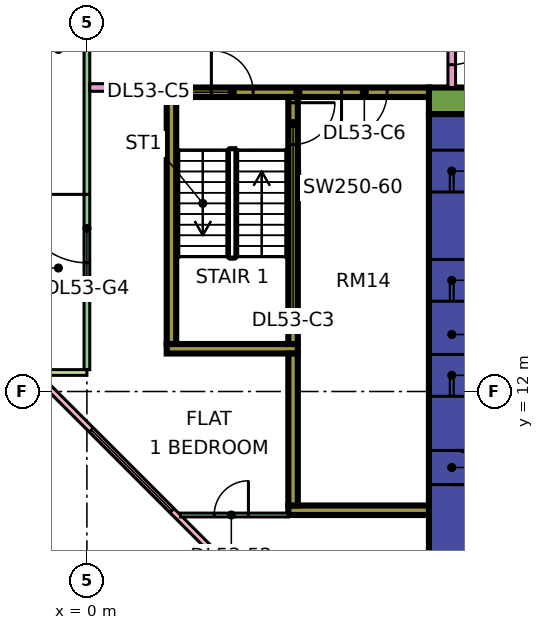
"""IFC4 building model, lengths in metres.
Left out: names, types, materials, properties, quantities, classifications, styles, units other than length and angle.
Written with IfcOpenShell. Run it as: python <this file> out.ifc"""

import sys

from ifc_helpers import new_model, si_unit, direction, frame, frame_2d, origin, place, context, subcontext, project, spatial, rectangle, extrude, element, fill, save


model = new_model("IFC4")
c1 = context("Model", 3, precision=1e-05, world=origin(), true_north=direction((0.0, 1.0)))
c2 = subcontext(c1, "Body", "Model", "MODEL_VIEW")
j1 = project(units=[si_unit("LENGTHUNIT", "METRE"), si_unit("PLANEANGLEUNIT", "RADIAN")], contexts=[c1])
p1 = place(None, origin())
s1 = spatial("IfcSite", under=j1, at=p1, CompositionType="ELEMENT")
p2 = place(p1, origin())
s2 = spatial("IfcBuilding", under=s1, at=p2, CompositionType="ELEMENT")
p3 = place(p2, frame((0.0, 0.0, 226.65)))
s3 = spatial("IfcBuildingStorey", under=s2, at=p3, CompositionType="ELEMENT", Elevation=226.65)
p4 = place(p3, frame((9.0, 19.65, 0.0), z_axis=(0.0, 0.0, 1.0), x_axis=(1.0, 0.0, 0.0)))
e1 = element("IfcWall", 1, at=p4, inside=s3, PredefinedType="SHEAR", context=c2, shape_type="SweptSolid", body=[
    extrude(rectangle(XDim=25.0, YDim=0.7, at=frame_2d((12.5, 0.0))), origin(), (0.0, 0.0, 1.0), 3.75),
])
p5 = place(p4, frame((19.1, 0.0, 0.0)))
e2 = element("IfcOpeningElement", 2, at=p5, cuts=e1, PredefinedType="OPENING", context=c2, shape_type="SweptSolid", body=[
    extrude(rectangle(XDim=1.8, YDim=2.4, at=frame_2d((0.9, 1.2))), frame((0.0, 0.36, 0.0), z_axis=(0.0, -1.0, 0.0), x_axis=(1.0, 0.0, 0.0)), (0.0, 0.0, 1.0), 0.72),
])
p6 = place(p3, frame((9.6, 7.7, 0.0), z_axis=(0.0, 0.0, 1.0), x_axis=(0.0, 1.0, 0.0)))
e3 = element("IfcWall", 3, at=p6, inside=s3, PredefinedType="SHEAR", context=c2, shape_type="SweptSolid", body=[
    extrude(rectangle(XDim=11.6, YDim=1.2, at=frame_2d((5.8, 0.0))), origin(), (0.0, 0.0, 1.0), 3.75),
])
p7 = place(p6, frame((4.175, 0.0, 0.0)))
e4 = element("IfcOpeningElement", 4, at=p7, cuts=e3, PredefinedType="OPENING", context=c2, shape_type="SweptSolid", body=[
    extrude(rectangle(XDim=1.1, YDim=2.2, at=frame_2d((0.55, 1.1))), frame((0.0, 0.61, 0.0), z_axis=(0.0, -1.0, 0.0), x_axis=(1.0, 0.0, 0.0)), (0.0, 0.0, 1.0), 1.22),
])
p8 = place(p6, frame((6.675, 0.0, 0.0)))
e5 = element("IfcOpeningElement", 5, at=p8, cuts=e3, PredefinedType="OPENING", context=c2, shape_type="SweptSolid", body=[
    extrude(rectangle(XDim=1.1, YDim=2.2, at=frame_2d((0.55, 1.1))), frame((0.0, 0.61, 0.0), z_axis=(0.0, -1.0, 0.0), x_axis=(1.0, 0.0, 0.0)), (0.0, 0.0, 1.0), 1.22),
])
p9 = place(p6, frame((9.55, 0.0, 0.0)))
e6 = element("IfcOpeningElement", 6, at=p9, cuts=e3, PredefinedType="OPENING", context=c2, shape_type="SweptSolid", body=[
    extrude(rectangle(XDim=1.1, YDim=2.2, at=frame_2d((0.55, 1.1))), frame((0.0, 0.61, 0.0), z_axis=(0.0, -1.0, 0.0), x_axis=(1.0, 0.0, 0.0)), (0.0, 0.0, 1.0), 1.22),
])
p10 = place(p6, frame((1.85, 0.0, 0.0)))
e7 = element("IfcOpeningElement", 7, at=p10, cuts=e3, PredefinedType="OPENING", context=c2, shape_type="SweptSolid", body=[
    extrude(rectangle(XDim=0.9, YDim=2.1, at=frame_2d((0.45, 1.05))), frame((0.0, 0.61, 0.0), z_axis=(0.0, -1.0, 0.0), x_axis=(1.0, 0.0, 0.0)), (0.0, 0.0, 1.0), 1.22),
])
p11 = place(p3, frame((2.1, 19.875, 0.0), z_axis=(0.0, 0.0, 1.0), x_axis=(1.0, 0.0, 0.0)))
e8 = element("IfcWall", 8, at=p11, inside=s3, PredefinedType="SHEAR", context=c2, shape_type="SweptSolid", body=[
    extrude(rectangle(XDim=6.9, YDim=0.25, at=frame_2d((3.45, 0.0))), origin(), (0.0, 0.0, 1.0), 3.75),
])
p12 = place(p11, frame((1.175, 0.0, 0.0)))
e9 = element("IfcOpeningElement", 9, at=p12, cuts=e8, PredefinedType="OPENING", context=c2, shape_type="SweptSolid", body=[
    extrude(rectangle(XDim=1.1, YDim=2.2, at=frame_2d((0.55, 1.1))), frame((0.0, 0.135, 0.0), z_axis=(0.0, -1.0, 0.0), x_axis=(1.0, 0.0, 0.0)), (0.0, 0.0, 1.0), 0.27),
])
p13 = place(p11, frame((4.6, 0.0, 0.0)))
e10 = element("IfcOpeningElement", 10, at=p13, cuts=e8, PredefinedType="OPENING", context=c2, shape_type="SweptSolid", body=[
    extrude(rectangle(XDim=1.2, YDim=2.2, at=frame_2d((0.6, 1.1))), frame((0.0, 0.135, 0.0), z_axis=(0.0, -1.0, 0.0), x_axis=(1.0, 0.0, 0.0)), (0.0, 0.0, 1.0), 0.27),
])
p14 = place(p3, frame((2.1, 13.125, 0.0), z_axis=(0.0, 0.0, 1.0), x_axis=(1.0, 0.0, 0.0)))
e11 = element("IfcWall", 11, at=p14, inside=s3, PredefinedType="SHEAR", context=c2, shape_type="SweptSolid", body=[
    extrude(rectangle(XDim=3.45, YDim=0.25, at=frame_2d((1.725, 0.0))), origin(), (0.0, 0.0, 1.0), 3.75),
])
p15 = place(p3, frame((2.225, 13.25, 0.0), z_axis=(0.0, 0.0, 1.0), x_axis=(0.0, 1.0, 0.0)))
e12 = element("IfcWall", 12, at=p15, inside=s3, PredefinedType="SHEAR", context=c2, shape_type="SweptSolid", body=[
    extrude(rectangle(XDim=6.5, YDim=0.25, at=frame_2d((3.25, 0.0))), origin(), (0.0, 0.0, 1.0), 3.75),
])
p16 = place(p3, frame((5.425, 13.25, 0.0), z_axis=(0.0, 0.0, 1.0), x_axis=(0.0, 1.0, 0.0)))
e13 = element("IfcWall", 13, at=p16, inside=s3, PredefinedType="SHEAR", context=c2, shape_type="SweptSolid", body=[
    extrude(rectangle(XDim=6.5, YDim=0.25, at=frame_2d((3.25, 0.0))), origin(), (0.0, 0.0, 1.0), 3.75),
])
p17 = place(p16, frame((5.25, 0.0, 0.0)))
e14 = element("IfcOpeningElement", 14, at=p17, cuts=e13, PredefinedType="OPENING", context=c2, shape_type="SweptSolid", body=[
    extrude(rectangle(XDim=1.1, YDim=2.2, at=frame_2d((0.55, 1.1))), frame((0.0, 0.135, 0.0), z_axis=(0.0, -1.0, 0.0), x_axis=(1.0, 0.0, 0.0)), (0.0, 0.0, 1.0), 0.27),
])
p18 = place(p3, frame((5.3, 8.875, 0.0), z_axis=(0.0, 0.0, 1.0), x_axis=(1.0, 0.0, 0.0)))
e15 = element("IfcWall", 15, at=p18, inside=s3, PredefinedType="SHEAR", context=c2, shape_type="SweptSolid", body=[
    extrude(rectangle(XDim=3.7, YDim=0.25, at=frame_2d((1.85, 0.0))), origin(), (0.0, 0.0, 1.0), 3.75),
])
p19 = place(p3, frame((5.425, 9.0, 0.0), z_axis=(0.0, 0.0, 1.0), x_axis=(0.0, 1.0, 0.0)))
e16 = element("IfcWall", 16, at=p19, inside=s3, PredefinedType="SHEAR", context=c2, shape_type="SweptSolid", body=[
    extrude(rectangle(XDim=4.0, YDim=0.25, at=frame_2d((2.0, 0.0))), origin(), (0.0, 0.0, 1.0), 3.75),
])
p20 = place(p3, frame((0.0, 23.925, 0.0), z_axis=(0.0, 0.0, 1.0), x_axis=(0.0, -1.0, 0.0)))
e17 = element("IfcWall", 17, at=p20, inside=s3, PredefinedType="SOLIDWALL", context=c2, shape_type="SweptSolid", body=[
    extrude(rectangle(XDim=11.35, YDim=0.15, at=frame_2d((5.675, 0.0))), origin(), (0.0, 0.0, 1.0), 3.35),
])
p21 = place(p20, frame((6.738, 0.0, 0.0)))
e18 = element("IfcOpeningElement", 18, at=p21, cuts=e17, PredefinedType="OPENING", context=c2, shape_type="SweptSolid", body=[
    extrude(rectangle(XDim=1.8, YDim=2.4, at=frame_2d((0.9, 1.2))), frame((0.0, 0.085, 0.0), z_axis=(0.0, -1.0, 0.0), x_axis=(1.0, 0.0, 0.0)), (0.0, 0.0, 1.0), 0.17),
])
p22 = place(p3, frame((-1.5, 12.5, 0.0), z_axis=(0.0, 0.0, 1.0), x_axis=(1.0, 0.0, 0.0)))
e19 = element("IfcWall", 19, at=p22, inside=s3, PredefinedType="SOLIDWALL", context=c2, shape_type="SweptSolid", body=[
    extrude(rectangle(XDim=1.5, YDim=0.15, at=frame_2d((0.75, 0.0))), origin(), (0.0, 0.0, 1.0), 3.35),
])
p23 = place(p3, frame((-1.447, 12.553, 0.0), z_axis=(0.0, 0.0, 1.0), x_axis=(0.707106781187, -0.707106781187, 0.0)))
e20 = element("IfcWall", 20, at=p23, inside=s3, PredefinedType="SOLIDWALL", context=c2, shape_type="SweptSolid", body=[
    extrude(rectangle(XDim=19.799, YDim=0.15, at=frame_2d((9.899, 0.0))), origin(), (0.0, 0.0, 1.0), 3.35),
])
p24 = place(p23, frame((2.212, 0.0, 0.45)))
e21 = element("IfcOpeningElement", 21, at=p24, cuts=e20, PredefinedType="OPENING", context=c2, shape_type="SweptSolid", body=[
    extrude(rectangle(XDim=3.0, YDim=2.4, at=frame_2d((1.5, 1.2))), frame((0.0, 0.085, 0.0), z_axis=(0.0, -1.0, 0.0), x_axis=(1.0, 0.0, 0.0)), (0.0, 0.0, 1.0), 0.17),
])
p25 = place(p23, frame((10.216, 0.0, 0.45)))
e22 = element("IfcOpeningElement", 22, at=p25, cuts=e20, PredefinedType="OPENING", context=c2, shape_type="SweptSolid", body=[
    extrude(rectangle(XDim=3.0, YDim=2.4, at=frame_2d((1.5, 1.2))), frame((0.0, 0.085, 0.0), z_axis=(0.0, -1.0, 0.0), x_axis=(1.0, 0.0, 0.0)), (0.0, 0.0, 1.0), 0.17),
])
p26 = place(p3, frame((0.074, 20.0, 0.0), z_axis=(0.0, 0.0, 1.0), x_axis=(1.0, 0.0, 0.0)))
e23 = element("IfcWall", 23, at=p26, inside=s3, PredefinedType="PARTITIONING", context=c2, shape_type="SweptSolid", body=[
    extrude(rectangle(XDim=2.026, YDim=0.2, at=frame_2d((1.013, 0.0))), origin(), (0.0, 0.0, 1.0), 3.35),
])
p27 = place(p3, frame((2.461, 8.75, 0.0), z_axis=(0.0, 0.0, 1.0), x_axis=(1.0, 0.0, 0.0)))
e24 = element("IfcWall", 24, at=p27, inside=s3, PredefinedType="PARTITIONING", context=c2, shape_type="SweptSolid", body=[
    extrude(rectangle(XDim=2.839, YDim=0.1, at=frame_2d((1.419, 0.0))), origin(), (0.0, 0.0, 1.0), 3.35),
])
p28 = place(p27, frame((0.889, 0.0, 0.0)))
e25 = element("IfcOpeningElement", 25, at=p28, cuts=e24, PredefinedType="OPENING", context=c2, shape_type="SweptSolid", body=[
    extrude(rectangle(XDim=0.9, YDim=2.1, at=frame_2d((0.45, 1.05))), frame((0.0, 0.06, 0.0), z_axis=(0.0, -1.0, 0.0), x_axis=(1.0, 0.0, 0.0)), (0.0, 0.0, 1.0), 0.12),
])
p29 = place(p3, frame((9.6, 20.0, 0.0), z_axis=(0.0, 0.0, 1.0), x_axis=(0.0, 1.0, 0.0)))
e26 = element("IfcWall", 26, at=p29, inside=s3, PredefinedType="PARTITIONING", context=c2, shape_type="SweptSolid", body=[
    extrude(rectangle(XDim=44.35, YDim=0.2, at=frame_2d((22.175, 0.0))), origin(), (0.0, 0.0, 1.0), 3.35),
])
p30 = place(p29, frame((17.1, 0.0, 0.0)))
e27 = element("IfcOpeningElement", 27, at=p30, cuts=e26, PredefinedType="OPENING", context=c2, shape_type="SweptSolid", body=[
    extrude(rectangle(XDim=1.0, YDim=2.1, at=frame_2d((0.5, 1.05))), frame((0.0, 0.11, 0.0), z_axis=(0.0, -1.0, 0.0), x_axis=(1.0, 0.0, 0.0)), (0.0, 0.0, 1.0), 0.22),
])
p31 = place(p29, frame((0.6, 0.0, 0.0)))
e28 = element("IfcOpeningElement", 28, at=p31, cuts=e26, PredefinedType="OPENING", context=c2, shape_type="SweptSolid", body=[
    extrude(rectangle(XDim=1.2, YDim=2.1, at=frame_2d((0.6, 1.05))), frame((0.0, 0.11, 0.0), z_axis=(0.0, -1.0, 0.0), x_axis=(1.0, 0.0, 0.0)), (0.0, 0.0, 1.0), 0.22),
])
p32 = place(p29, frame((3.9, 0.0, 0.0)))
e29 = element("IfcOpeningElement", 29, at=p32, cuts=e26, PredefinedType="OPENING", context=c2, shape_type="SweptSolid", body=[
    extrude(rectangle(XDim=1.0, YDim=2.1, at=frame_2d((0.5, 1.05))), frame((0.0, 0.11, 0.0), z_axis=(0.0, -1.0, 0.0), x_axis=(1.0, 0.0, 0.0)), (0.0, 0.0, 1.0), 0.22),
])
p33 = place(p21, frame((1.8, 0.0, 0.0), z_axis=(0.0, 0.0, 1.0), x_axis=(-1.0, 0.0, 0.0)))
e30 = element("IfcDoor", 30, at=p33, inside=s3, OperationType="DOUBLE_DOOR_SINGLE_SWING", PredefinedType="DOOR", context=c2, shape_type="SweptSolid", body=[
    extrude(rectangle(XDim=1.8, YDim=2.4, at=frame_2d((0.9, 1.2))), frame((0.0, 0.025, 0.0), z_axis=(0.0, -1.0, 0.0), x_axis=(1.0, 0.0, 0.0)), (0.0, 0.0, 1.0), 0.05),
])
fill(e18, e30)
p34 = place(p24, origin())
e31 = element("IfcWindow", 31, at=p34, inside=s3, PartitioningType="SINGLE_PANEL", PredefinedType="WINDOW", context=c2, shape_type="SweptSolid", body=[
    extrude(rectangle(XDim=3.0, YDim=2.4, at=frame_2d((1.5, 1.2))), frame((0.0, 0.03, 0.0), z_axis=(0.0, -1.0, 0.0), x_axis=(1.0, 0.0, 0.0)), (0.0, 0.0, 1.0), 0.06),
])
fill(e21, e31)
p35 = place(p7, origin())
e32 = element("IfcDoor", 32, at=p35, inside=s3, OperationType="DOUBLE_DOOR_SLIDING", PredefinedType="DOOR", context=c2, shape_type="SweptSolid", body=[
    extrude(rectangle(XDim=1.1, YDim=2.2, at=frame_2d((0.55, 1.1))), frame((0.0, 0.025, 0.0), z_axis=(0.0, -1.0, 0.0), x_axis=(1.0, 0.0, 0.0)), (0.0, 0.0, 1.0), 0.05),
])
fill(e4, e32)
p36 = place(p8, origin())
e33 = element("IfcDoor", 33, at=p36, inside=s3, OperationType="DOUBLE_DOOR_SLIDING", PredefinedType="DOOR", context=c2, shape_type="SweptSolid", body=[
    extrude(rectangle(XDim=1.1, YDim=2.2, at=frame_2d((0.55, 1.1))), frame((0.0, 0.025, 0.0), z_axis=(0.0, -1.0, 0.0), x_axis=(1.0, 0.0, 0.0)), (0.0, 0.0, 1.0), 0.05),
])
fill(e5, e33)
p37 = place(p9, origin())
e34 = element("IfcDoor", 34, at=p37, inside=s3, OperationType="DOUBLE_DOOR_SLIDING", PredefinedType="DOOR", context=c2, shape_type="SweptSolid", body=[
    extrude(rectangle(XDim=1.1, YDim=2.2, at=frame_2d((0.55, 1.1))), frame((0.0, 0.025, 0.0), z_axis=(0.0, -1.0, 0.0), x_axis=(1.0, 0.0, 0.0)), (0.0, 0.0, 1.0), 0.05),
])
fill(e6, e34)
p38 = place(p17, origin())
e35 = element("IfcDoor", 35, at=p38, inside=s3, OperationType="SINGLE_SWING_RIGHT", PredefinedType="DOOR", context=c2, shape_type="SweptSolid", body=[
    extrude(rectangle(XDim=1.1, YDim=2.2, at=frame_2d((0.55, 1.1))), frame((0.0, 0.025, 0.0), z_axis=(0.0, -1.0, 0.0), x_axis=(1.0, 0.0, 0.0)), (0.0, 0.0, 1.0), 0.05),
])
fill(e14, e35)
p39 = place(p10, frame((0.9, 0.0, 0.0), z_axis=(0.0, 0.0, 1.0), x_axis=(-1.0, 0.0, 0.0)))
e36 = element("IfcDoor", 36, at=p39, inside=s3, OperationType="SINGLE_SWING_LEFT", PredefinedType="DOOR", context=c2, shape_type="SweptSolid", body=[
    extrude(rectangle(XDim=0.9, YDim=2.1, at=frame_2d((0.45, 1.05))), frame((0.0, 0.025, 0.0), z_axis=(0.0, -1.0, 0.0), x_axis=(1.0, 0.0, 0.0)), (0.0, 0.0, 1.0), 0.05),
])
fill(e7, e36)
p40 = place(p12, origin())
e37 = element("IfcDoor", 37, at=p40, inside=s3, OperationType="SINGLE_SWING_LEFT", PredefinedType="DOOR", context=c2, shape_type="SweptSolid", body=[
    extrude(rectangle(XDim=1.1, YDim=2.2, at=frame_2d((0.55, 1.1))), frame((0.0, 0.025, 0.0), z_axis=(0.0, -1.0, 0.0), x_axis=(1.0, 0.0, 0.0)), (0.0, 0.0, 1.0), 0.05),
])
fill(e9, e37)
p41 = place(p13, frame((1.2, 0.0, 0.0), z_axis=(0.0, 0.0, 1.0), x_axis=(-1.0, 0.0, 0.0)))
e38 = element("IfcDoor", 38, at=p41, inside=s3, OperationType="SINGLE_SWING_LEFT", PredefinedType="DOOR", context=c2, shape_type="SweptSolid", body=[
    extrude(rectangle(XDim=1.2, YDim=2.2, at=frame_2d((0.6, 1.1))), frame((0.0, 0.025, 0.0), z_axis=(0.0, -1.0, 0.0), x_axis=(1.0, 0.0, 0.0)), (0.0, 0.0, 1.0), 0.05),
])
fill(e10, e38)
p42 = place(p31, origin())
e39 = element("IfcDoor", 39, at=p42, inside=s3, OperationType="SINGLE_SWING_RIGHT", PredefinedType="DOOR", context=c2, shape_type="SweptSolid", body=[
    extrude(rectangle(XDim=1.2, YDim=2.1, at=frame_2d((0.6, 1.05))), frame((0.0, 0.025, 0.0), z_axis=(0.0, -1.0, 0.0), x_axis=(1.0, 0.0, 0.0)), (0.0, 0.0, 1.0), 0.05),
])
fill(e28, e39)
p43 = place(p28, frame((0.9, 0.0, 0.0), z_axis=(0.0, 0.0, 1.0), x_axis=(-1.0, 0.0, 0.0)))
e40 = element("IfcDoor", 40, at=p43, inside=s3, OperationType="SINGLE_SWING_RIGHT", PredefinedType="DOOR", context=c2, shape_type="SweptSolid", body=[
    extrude(rectangle(XDim=0.9, YDim=2.1, at=frame_2d((0.45, 1.05))), frame((0.0, 0.025, 0.0), z_axis=(0.0, -1.0, 0.0), x_axis=(1.0, 0.0, 0.0)), (0.0, 0.0, 1.0), 0.05),
])
fill(e25, e40)
save(model, sys.argv[1])
